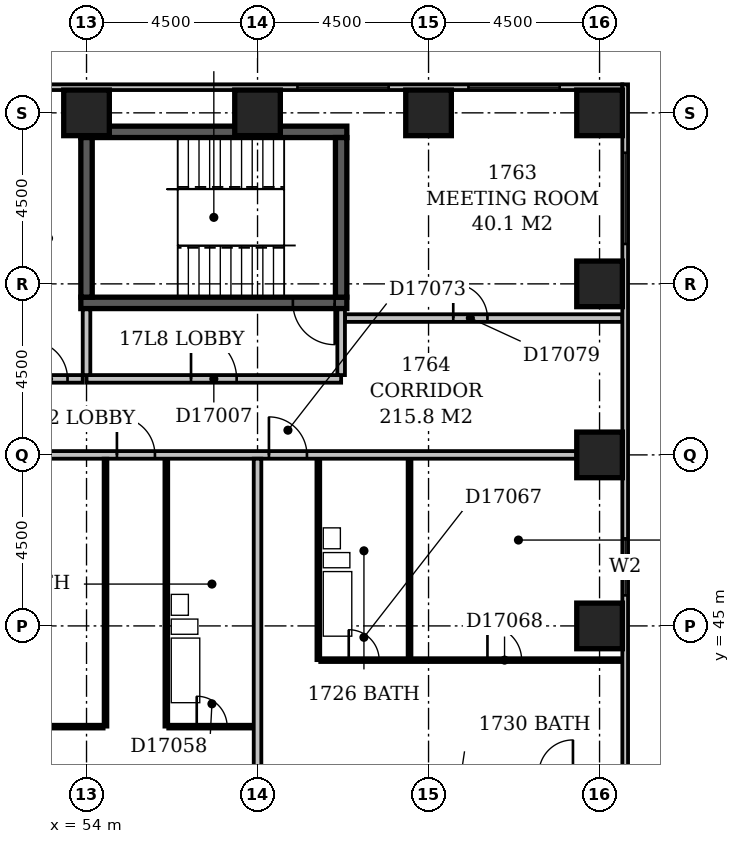
"""IFC4 building model, lengths in metres.
Left out: names, types, materials, properties, quantities, classifications, styles, units other than length and angle.
Written with IfcOpenShell. Run it as: python <this file> out.ifc"""

import sys

from ifc_helpers import new_model, si_unit, direction, frame, frame_2d, origin, origin_2d, place, context, subcontext, project, spatial, rectangle, extrude, element, fill, save


model = new_model("IFC4")
c1 = context("Model", 3, precision=1e-05, world=origin(), true_north=direction((0.0, 1.0)))
c2 = subcontext(c1, "Body", "Model", "MODEL_VIEW")
j1 = project(units=[si_unit("LENGTHUNIT", "METRE"), si_unit("PLANEANGLEUNIT", "RADIAN")], contexts=[c1])
p1 = place(None, origin())
s1 = spatial("IfcSite", under=j1, at=p1, CompositionType="ELEMENT")
p2 = place(p1, origin())
s2 = spatial("IfcBuilding", under=s1, at=p2, CompositionType="ELEMENT")
p3 = place(p2, frame((0.0, 0.0, 72.2)))
s3 = spatial("IfcBuildingStorey", under=s2, at=p3, CompositionType="ELEMENT", Elevation=72.2)
p4 = place(p3, frame((53.85, 53.5, -0.3), z_axis=(0.0, 0.0, 1.0), x_axis=(1.0, 0.0, 0.0)))
e1 = element("IfcWall", 1, at=p4, inside=s3, PredefinedType="SHEAR", context=c2, shape_type="SweptSolid", body=[
    extrude(rectangle(XDim=7.0, YDim=0.3, at=frame_2d((3.5, 0.0))), origin(), (0.0, 0.0, 1.0), 3.6),
])
p5 = place(p4, frame((5.58, 0.0, 0.3)))
e2 = element("IfcOpeningElement", 2, at=p5, cuts=e1, PredefinedType="OPENING", context=c2, shape_type="SweptSolid", body=[
    extrude(rectangle(XDim=1.1, YDim=2.1, at=frame_2d((0.55, 1.05))), frame((0.0, 0.162, 0.0), z_axis=(0.0, -1.0, 0.0), x_axis=(1.0, 0.0, 0.0)), (0.0, 0.0, 1.0), 0.324),
])
p6 = place(p3, frame((53.85, 58.0, -0.3), z_axis=(0.0, 0.0, 1.0), x_axis=(1.0, 0.0, 0.0)))
e3 = element("IfcWall", 3, at=p6, inside=s3, PredefinedType="SHEAR", context=c2, shape_type="SweptSolid", body=[
    extrude(rectangle(XDim=7.0, YDim=0.3, at=frame_2d((3.5, 0.0))), origin(), (0.0, 0.0, 1.0), 3.6),
])
for number, where, z_axis, x_axis in (
    (4, (54.0, 53.65, -0.3), (0.0, 0.0, 1.0), (0.0, 1.0, 0.0)),
    (5, (60.7, 53.65, -0.3), (0.0, 0.0, 1.0), (0.0, 1.0, 0.0)),
):
    element("IfcWall", number, at=place(p3, frame(where, z_axis=z_axis, x_axis=x_axis)), inside=s3, PredefinedType="SHEAR", context=c2, shape_type="SweptSolid", body=[
        extrude(rectangle(XDim=4.2, YDim=0.3, at=frame_2d((2.1, 0.0))), origin(), (0.0, 0.0, 1.0), 3.6),
    ])
for number, where, z_axis, x_axis in (
    (6, (67.5, 45.0, -0.3), (0.0, 0.0, 1.0), (1.0, 0.0, 0.0)),
    (7, (67.5, 49.5, -0.3), (0.0, 0.0, 1.0), (1.0, 0.0, 0.0)),
    (8, (67.5, 54.0, -0.3), (0.0, 0.0, 1.0), (1.0, 0.0, 0.0)),
    (9, (54.0, 58.5, -0.3), (0.0, 0.0, 1.0), (1.0, 0.0, 0.0)),
    (10, (58.5, 58.5, -0.3), (0.0, 0.0, 1.0), (1.0, 0.0, 0.0)),
    (11, (63.0, 58.5, -0.3), (0.0, 0.0, 1.0), (1.0, 0.0, 0.0)),
    (12, (67.5, 58.5, -0.3), (0.0, 0.0, 1.0), (1.0, 0.0, 0.0)),
):
    element("IfcColumn", number, at=place(p3, frame(where, z_axis=z_axis, x_axis=x_axis)), inside=s3, PredefinedType="COLUMN", context=c2, shape_type="SweptSolid", body=[
        extrude(rectangle(XDim=1.2, YDim=1.2, at=origin_2d()), origin(), (0.0, 0.0, 1.0), 3.6),
    ])
p7 = place(p3, frame((68.175, 35.4, 0.0), z_axis=(0.0, 0.0, 1.0), x_axis=(0.0, 1.0, 0.0)))
e13 = element("IfcWall", 13, at=p7, inside=s3, PredefinedType="STANDARD", context=c2, shape_type="SweptSolid", body=[
    extrude(rectangle(XDim=23.85, YDim=0.15, at=frame_2d((11.925, 0.0))), origin(), (0.0, 0.0, 1.0), 2.7),
])
p8 = place(p7, frame((1.65, 0.0, 0.6)))
e14 = element("IfcOpeningElement", 14, at=p8, cuts=e13, PredefinedType="OPENING", context=c2, shape_type="SweptSolid", body=[
    extrude(rectangle(XDim=2.4, YDim=1.8, at=frame_2d((1.2, 0.9))), frame((0.0, 0.087, 0.0), z_axis=(0.0, -1.0, 0.0), x_axis=(1.0, 0.0, 0.0)), (0.0, 0.0, 1.0), 0.174),
])
p9 = place(p7, frame((10.403, 0.0, 0.6)))
e15 = element("IfcOpeningElement", 15, at=p9, cuts=e13, PredefinedType="OPENING", context=c2, shape_type="SweptSolid", body=[
    extrude(rectangle(XDim=1.5, YDim=1.8, at=frame_2d((0.75, 0.9))), frame((0.0, 0.087, 0.0), z_axis=(0.0, -1.0, 0.0), x_axis=(1.0, 0.0, 0.0)), (0.0, 0.0, 1.0), 0.174),
])
p10 = place(p7, frame((19.65, 0.0, 0.6)))
e16 = element("IfcOpeningElement", 16, at=p10, cuts=e13, PredefinedType="OPENING", context=c2, shape_type="SweptSolid", body=[
    extrude(rectangle(XDim=2.4, YDim=1.8, at=frame_2d((1.2, 0.9))), frame((0.0, 0.087, 0.0), z_axis=(0.0, -1.0, 0.0), x_axis=(1.0, 0.0, 0.0)), (0.0, 0.0, 1.0), 0.174),
])
p11 = place(p3, frame((68.1, 59.175, 0.0), z_axis=(0.0, 0.0, 1.0), x_axis=(-1.0, 0.0, 0.0)))
e17 = element("IfcWall", 17, at=p11, inside=s3, PredefinedType="STANDARD", context=c2, shape_type="SweptSolid", body=[
    extrude(rectangle(XDim=68.85, YDim=0.15, at=frame_2d((34.425, 0.0))), origin(), (0.0, 0.0, 1.0), 2.7),
])
p12 = place(p11, frame((1.65, 0.0, 0.6)))
e18 = element("IfcOpeningElement", 18, at=p12, cuts=e17, PredefinedType="OPENING", context=c2, shape_type="SweptSolid", body=[
    extrude(rectangle(XDim=2.4, YDim=1.8, at=frame_2d((1.2, 0.9))), frame((0.0, 0.087, 0.0), z_axis=(0.0, -1.0, 0.0), x_axis=(1.0, 0.0, 0.0)), (0.0, 0.0, 1.0), 0.174),
])
p13 = place(p11, frame((6.15, 0.0, 0.6)))
e19 = element("IfcOpeningElement", 19, at=p13, cuts=e17, PredefinedType="OPENING", context=c2, shape_type="SweptSolid", body=[
    extrude(rectangle(XDim=2.4, YDim=1.8, at=frame_2d((1.2, 0.9))), frame((0.0, 0.087, 0.0), z_axis=(0.0, -1.0, 0.0), x_axis=(1.0, 0.0, 0.0)), (0.0, 0.0, 1.0), 0.174),
])
p14 = place(p11, frame((37.403, 0.0, 0.6)))
e20 = element("IfcOpeningElement", 20, at=p14, cuts=e17, PredefinedType="OPENING", context=c2, shape_type="SweptSolid", body=[
    extrude(rectangle(XDim=1.5, YDim=1.8, at=frame_2d((0.75, 0.9))), frame((0.0, 0.087, 0.0), z_axis=(0.0, -1.0, 0.0), x_axis=(1.0, 0.0, 0.0)), (0.0, 0.0, 1.0), 0.174),
])
p15 = place(p3, frame((54.0, 51.5, 0.0), z_axis=(0.0, 0.0, 1.0), x_axis=(1.0, 0.0, 0.0)))
e21 = element("IfcWall", 21, at=p15, inside=s3, PredefinedType="PARTITIONING", context=c2, shape_type="SweptSolid", body=[
    extrude(rectangle(XDim=6.7, YDim=0.2, at=frame_2d((3.35, 0.0))), origin(), (0.0, 0.0, 1.0), 3.3),
])
p16 = place(p15, frame((2.75, 0.0, 0.0)))
e22 = element("IfcOpeningElement", 22, at=p16, cuts=e21, PredefinedType="OPENING", context=c2, shape_type="SweptSolid", body=[
    extrude(rectangle(XDim=1.2, YDim=2.1, at=frame_2d((0.6, 1.05))), frame((0.0, 0.112, 0.0), z_axis=(0.0, -1.0, 0.0), x_axis=(1.0, 0.0, 0.0)), (0.0, 0.0, 1.0), 0.224),
])
p17 = place(p3, frame((60.7, 51.6, 0.0), z_axis=(0.0, 0.0, 1.0), x_axis=(0.0, 1.0, 0.0)))
e23 = element("IfcWall", 23, at=p17, inside=s3, PredefinedType="PARTITIONING", context=c2, shape_type="SweptSolid", body=[
    extrude(rectangle(XDim=1.73, YDim=0.2, at=frame_2d((0.865, 0.0))), origin(), (0.0, 0.0, 1.0), 3.3),
])
p18 = place(p3, frame((54.0, 51.6, 0.0), z_axis=(0.0, 0.0, 1.0), x_axis=(0.0, 1.0, 0.0)))
e24 = element("IfcWall", 24, at=p18, inside=s3, PredefinedType="PARTITIONING", context=c2, shape_type="SweptSolid", body=[
    extrude(rectangle(XDim=1.73, YDim=0.2, at=frame_2d((0.865, 0.0))), origin(), (0.0, 0.0, 1.0), 2.6),
])
p19 = place(p3, frame((58.5, 36.6, 0.0), z_axis=(0.0, 0.0, 1.0), x_axis=(0.0, 1.0, 0.0)))
e25 = element("IfcWall", 25, at=p19, inside=s3, PredefinedType="PARTITIONING", context=c2, shape_type="SweptSolid", body=[
    extrude(rectangle(XDim=12.8, YDim=0.2, at=frame_2d((6.4, 0.0))), origin(), (0.0, 0.0, 1.0), 3.3),
])
p20 = place(p3, frame((49.6, 42.35, 0.0), z_axis=(0.0, 0.0, 1.0), x_axis=(1.0, 0.0, 0.0)))
e26 = element("IfcWall", 26, at=p20, inside=s3, PredefinedType="PARTITIONING", context=c2, shape_type="SweptSolid", body=[
    extrude(rectangle(XDim=4.85, YDim=0.1, at=frame_2d((2.425, 0.0))), origin(), (0.0, 0.0, 1.0), 3.3),
])
p21 = place(p20, frame((1.95, 0.0, 0.0)))
e27 = element("IfcOpeningElement", 27, at=p21, cuts=e26, PredefinedType="OPENING", context=c2, shape_type="SweptSolid", body=[
    extrude(rectangle(XDim=0.9, YDim=2.1, at=frame_2d((0.45, 1.05))), frame((0.0, 0.062, 0.0), z_axis=(0.0, -1.0, 0.0), x_axis=(1.0, 0.0, 0.0)), (0.0, 0.0, 1.0), 0.124),
])
p22 = place(p3, frame((54.5, 42.35, 0.0), z_axis=(0.0, 0.0, 1.0), x_axis=(0.0, 1.0, 0.0)))
e28 = element("IfcWall", 28, at=p22, inside=s3, PredefinedType="PARTITIONING", context=c2, shape_type="SweptSolid", body=[
    extrude(rectangle(XDim=7.05, YDim=0.1, at=frame_2d((3.525, 0.0))), origin(), (0.0, 0.0, 1.0), 2.6),
])
p23 = place(p3, frame((56.1, 42.35, 0.0), z_axis=(0.0, 0.0, 1.0), x_axis=(0.0, 1.0, 0.0)))
e29 = element("IfcWall", 29, at=p23, inside=s3, PredefinedType="PLUMBINGWALL", context=c2, shape_type="SweptSolid", body=[
    extrude(rectangle(XDim=7.05, YDim=0.1, at=frame_2d((3.525, 0.0))), origin(), (0.0, 0.0, 1.0), 3.3),
])
p24 = place(p3, frame((56.15, 42.35, 0.0), z_axis=(0.0, 0.0, 1.0), x_axis=(1.0, 0.0, 0.0)))
e30 = element("IfcWall", 30, at=p24, inside=s3, PredefinedType="PARTITIONING", context=c2, shape_type="SweptSolid", body=[
    extrude(rectangle(XDim=2.25, YDim=0.1, at=frame_2d((1.125, 0.0))), origin(), (0.0, 0.0, 1.0), 3.3),
])
p25 = place(p24, frame((0.75, 0.0, 0.0)))
e31 = element("IfcOpeningElement", 31, at=p25, cuts=e30, PredefinedType="OPENING", context=c2, shape_type="SweptSolid", body=[
    extrude(rectangle(XDim=0.8, YDim=2.1, at=frame_2d((0.4, 1.05))), frame((0.0, 0.062, 0.0), z_axis=(0.0, -1.0, 0.0), x_axis=(1.0, 0.0, 0.0)), (0.0, 0.0, 1.0), 0.124),
])
p26 = place(p3, frame((60.1, 44.1, 0.0), z_axis=(0.0, 0.0, 1.0), x_axis=(0.0, 1.0, 0.0)))
e32 = element("IfcWall", 32, at=p26, inside=s3, PredefinedType="PLUMBINGWALL", context=c2, shape_type="SweptSolid", body=[
    extrude(rectangle(XDim=5.3, YDim=0.1, at=frame_2d((2.65, 0.0))), origin(), (0.0, 0.0, 1.0), 3.3),
])
p27 = place(p3, frame((60.15, 44.1, 0.0), z_axis=(0.0, 0.0, 1.0), x_axis=(1.0, 0.0, 0.0)))
e33 = element("IfcWall", 33, at=p27, inside=s3, PredefinedType="PARTITIONING", context=c2, shape_type="SweptSolid", body=[
    extrude(rectangle(XDim=7.95, YDim=0.1, at=frame_2d((3.975, 0.0))), origin(), (0.0, 0.0, 1.0), 3.3),
])
p28 = place(p27, frame((0.75, 0.0, 0.0)))
e34 = element("IfcOpeningElement", 34, at=p28, cuts=e33, PredefinedType="OPENING", context=c2, shape_type="SweptSolid", body=[
    extrude(rectangle(XDim=0.8, YDim=2.1, at=frame_2d((0.4, 1.05))), frame((0.0, 0.062, 0.0), z_axis=(0.0, -1.0, 0.0), x_axis=(1.0, 0.0, 0.0)), (0.0, 0.0, 1.0), 0.124),
])
p29 = place(p27, frame((4.4, 0.0, 0.0)))
e35 = element("IfcOpeningElement", 35, at=p29, cuts=e33, PredefinedType="OPENING", context=c2, shape_type="SweptSolid", body=[
    extrude(rectangle(XDim=0.9, YDim=2.1, at=frame_2d((0.45, 1.05))), frame((0.0, 0.062, 0.0), z_axis=(0.0, -1.0, 0.0), x_axis=(1.0, 0.0, 0.0)), (0.0, 0.0, 1.0), 0.124),
])
p30 = place(p3, frame((62.5, 44.15, 0.0), z_axis=(0.0, 0.0, 1.0), x_axis=(0.0, 1.0, 0.0)))
e36 = element("IfcWall", 36, at=p30, inside=s3, PredefinedType="PLUMBINGWALL", context=c2, shape_type="SweptSolid", body=[
    extrude(rectangle(XDim=5.25, YDim=0.1, at=frame_2d((2.625, 0.0))), origin(), (0.0, 0.0, 1.0), 2.4),
])
p31 = place(p3, frame((9.1, 49.5, 0.0), z_axis=(0.0, 0.0, 1.0), x_axis=(1.0, 0.0, 0.0)))
e37 = element("IfcWall", 37, at=p31, inside=s3, PredefinedType="PARTITIONING", context=c2, shape_type="SweptSolid", body=[
    extrude(rectangle(XDim=57.8, YDim=0.2, at=frame_2d((28.9, 0.0))), origin(), (0.0, 0.0, 1.0), 3.3),
])
p32 = place(p31, frame((13.7, 0.0, 0.0)))
e38 = element("IfcOpeningElement", 38, at=p32, cuts=e37, PredefinedType="OPENING", context=c2, shape_type="SweptSolid", body=[
    extrude(rectangle(XDim=1.0, YDim=2.1, at=frame_2d((0.5, 1.05))), frame((0.0, 0.112, 0.0), z_axis=(0.0, -1.0, 0.0), x_axis=(1.0, 0.0, 0.0)), (0.0, 0.0, 1.0), 0.224),
])
p33 = place(p31, frame((32.2, 0.0, 0.0)))
e39 = element("IfcOpeningElement", 39, at=p33, cuts=e37, PredefinedType="OPENING", context=c2, shape_type="SweptSolid", body=[
    extrude(rectangle(XDim=1.0, YDim=2.1, at=frame_2d((0.5, 1.05))), frame((0.0, 0.112, 0.0), z_axis=(0.0, -1.0, 0.0), x_axis=(1.0, 0.0, 0.0)), (0.0, 0.0, 1.0), 0.224),
])
p34 = place(p31, frame((37.85, 0.0, 0.0)))
e40 = element("IfcOpeningElement", 40, at=p34, cuts=e37, PredefinedType="OPENING", context=c2, shape_type="SweptSolid", body=[
    extrude(rectangle(XDim=1.0, YDim=2.1, at=frame_2d((0.5, 1.05))), frame((0.0, 0.112, 0.0), z_axis=(0.0, -1.0, 0.0), x_axis=(1.0, 0.0, 0.0)), (0.0, 0.0, 1.0), 0.224),
])
p35 = place(p31, frame((45.7, 0.0, 0.0)))
e41 = element("IfcOpeningElement", 41, at=p35, cuts=e37, PredefinedType="OPENING", context=c2, shape_type="SweptSolid", body=[
    extrude(rectangle(XDim=1.0, YDim=2.1, at=frame_2d((0.5, 1.05))), frame((0.0, 0.112, 0.0), z_axis=(0.0, -1.0, 0.0), x_axis=(1.0, 0.0, 0.0)), (0.0, 0.0, 1.0), 0.224),
])
p36 = place(p31, frame((49.7, 0.0, 0.0)))
e42 = element("IfcOpeningElement", 42, at=p36, cuts=e37, PredefinedType="OPENING", context=c2, shape_type="SweptSolid", body=[
    extrude(rectangle(XDim=1.0, YDim=2.1, at=frame_2d((0.5, 1.05))), frame((0.0, 0.112, 0.0), z_axis=(0.0, -1.0, 0.0), x_axis=(1.0, 0.0, 0.0)), (0.0, 0.0, 1.0), 0.224),
])
p37 = place(p31, frame((8.4, 0.0, 0.0)))
e43 = element("IfcOpeningElement", 43, at=p37, cuts=e37, PredefinedType="OPENING", context=c2, shape_type="SweptSolid", body=[
    extrude(rectangle(XDim=0.9, YDim=2.1, at=frame_2d((0.45, 1.05))), frame((0.0, 0.112, 0.0), z_axis=(0.0, -1.0, 0.0), x_axis=(1.0, 0.0, 0.0)), (0.0, 0.0, 1.0), 0.224),
])
p38 = place(p3, frame((52.1, 51.5, 0.0), z_axis=(0.0, 0.0, 1.0), x_axis=(1.0, 0.0, 0.0)))
e44 = element("IfcWall", 44, at=p38, inside=s3, PredefinedType="PARTITIONING", context=c2, shape_type="SweptSolid", body=[
    extrude(rectangle(XDim=1.8, YDim=0.2, at=frame_2d((0.9, 0.0))), origin(), (0.0, 0.0, 1.0), 3.3),
])
p39 = place(p38, frame((0.4, 0.0, 0.0)))
e45 = element("IfcOpeningElement", 45, at=p39, cuts=e44, PredefinedType="OPENING", context=c2, shape_type="SweptSolid", body=[
    extrude(rectangle(XDim=1.0, YDim=2.1, at=frame_2d((0.5, 1.05))), frame((0.0, 0.112, 0.0), z_axis=(0.0, -1.0, 0.0), x_axis=(1.0, 0.0, 0.0)), (0.0, 0.0, 1.0), 0.224),
])
p40 = place(p3, frame((60.8, 53.1, 0.0), z_axis=(0.0, 0.0, 1.0), x_axis=(1.0, 0.0, 0.0)))
e46 = element("IfcWall", 46, at=p40, inside=s3, PredefinedType="PARTITIONING", context=c2, shape_type="SweptSolid", body=[
    extrude(rectangle(XDim=7.3, YDim=0.2, at=frame_2d((3.65, 0.0))), origin(), (0.0, 0.0, 1.0), 3.3),
])
p41 = place(p40, frame((2.85, 0.0, 0.0)))
e47 = element("IfcOpeningElement", 47, at=p41, cuts=e46, PredefinedType="OPENING", context=c2, shape_type="SweptSolid", body=[
    extrude(rectangle(XDim=0.9, YDim=2.1, at=frame_2d((0.45, 1.05))), frame((0.0, 0.112, 0.0), z_axis=(0.0, -1.0, 0.0), x_axis=(1.0, 0.0, 0.0)), (0.0, 0.0, 1.0), 0.224),
])
p42 = place(p9, origin())
e48 = element("IfcWindow", 48, at=p42, inside=s3, PartitioningType="SINGLE_PANEL", PredefinedType="WINDOW", context=c2, shape_type="SweptSolid", body=[
    extrude(rectangle(XDim=1.5, YDim=1.8, at=frame_2d((0.75, 0.9))), frame((0.0, 0.03, 0.0), z_axis=(0.0, -1.0, 0.0), x_axis=(1.0, 0.0, 0.0)), (0.0, 0.0, 1.0), 0.06),
])
fill(e15, e48)
p43 = place(p10, origin())
e49 = element("IfcWindow", 49, at=p43, inside=s3, PartitioningType="SINGLE_PANEL", PredefinedType="WINDOW", context=c2, shape_type="SweptSolid", body=[
    extrude(rectangle(XDim=2.4, YDim=1.8, at=frame_2d((1.2, 0.9))), frame((0.0, 0.03, 0.0), z_axis=(0.0, -1.0, 0.0), x_axis=(1.0, 0.0, 0.0)), (0.0, 0.0, 1.0), 0.06),
])
fill(e16, e49)
p44 = place(p12, origin())
e50 = element("IfcWindow", 50, at=p44, inside=s3, PartitioningType="SINGLE_PANEL", PredefinedType="WINDOW", context=c2, shape_type="SweptSolid", body=[
    extrude(rectangle(XDim=2.4, YDim=1.8, at=frame_2d((1.2, 0.9))), frame((0.0, 0.03, 0.0), z_axis=(0.0, -1.0, 0.0), x_axis=(1.0, 0.0, 0.0)), (0.0, 0.0, 1.0), 0.06),
])
fill(e18, e50)
p45 = place(p13, origin())
e51 = element("IfcWindow", 51, at=p45, inside=s3, PartitioningType="SINGLE_PANEL", PredefinedType="WINDOW", context=c2, shape_type="SweptSolid", body=[
    extrude(rectangle(XDim=2.4, YDim=1.8, at=frame_2d((1.2, 0.9))), frame((0.0, 0.03, 0.0), z_axis=(0.0, -1.0, 0.0), x_axis=(1.0, 0.0, 0.0)), (0.0, 0.0, 1.0), 0.06),
])
fill(e19, e51)
p46 = place(p16, origin())
e52 = element("IfcDoor", 52, at=p46, inside=s3, OperationType="SINGLE_SWING_LEFT", PredefinedType="DOOR", context=c2, shape_type="SweptSolid", body=[
    extrude(rectangle(XDim=1.2, YDim=2.1, at=frame_2d((0.6, 1.05))), frame((0.0, 0.025, 0.0), z_axis=(0.0, -1.0, 0.0), x_axis=(1.0, 0.0, 0.0)), (0.0, 0.0, 1.0), 0.05),
])
fill(e22, e52)
p47 = place(p5, origin())
e53 = element("IfcDoor", 53, at=p47, inside=s3, OperationType="SINGLE_SWING_RIGHT", PredefinedType="DOOR", context=c2, shape_type="SweptSolid", body=[
    extrude(rectangle(XDim=1.1, YDim=2.1, at=frame_2d((0.55, 1.05))), frame((0.0, 0.025, 0.0), z_axis=(0.0, -1.0, 0.0), x_axis=(1.0, 0.0, 0.0)), (0.0, 0.0, 1.0), 0.05),
])
fill(e2, e53)
p48 = place(p25, origin())
e54 = element("IfcDoor", 54, at=p48, inside=s3, OperationType="SINGLE_SWING_LEFT", PredefinedType="DOOR", context=c2, shape_type="SweptSolid", body=[
    extrude(rectangle(XDim=0.8, YDim=2.1, at=frame_2d((0.4, 1.05))), frame((0.0, 0.025, 0.0), z_axis=(0.0, -1.0, 0.0), x_axis=(1.0, 0.0, 0.0)), (0.0, 0.0, 1.0), 0.05),
])
fill(e31, e54)
p49 = place(p28, origin())
e55 = element("IfcDoor", 55, at=p49, inside=s3, OperationType="SINGLE_SWING_LEFT", PredefinedType="DOOR", context=c2, shape_type="SweptSolid", body=[
    extrude(rectangle(XDim=0.8, YDim=2.1, at=frame_2d((0.4, 1.05))), frame((0.0, 0.025, 0.0), z_axis=(0.0, -1.0, 0.0), x_axis=(1.0, 0.0, 0.0)), (0.0, 0.0, 1.0), 0.05),
])
fill(e34, e55)
p50 = place(p29, origin())
e56 = element("IfcDoor", 56, at=p50, inside=s3, OperationType="SINGLE_SWING_LEFT", PredefinedType="DOOR", context=c2, shape_type="SweptSolid", body=[
    extrude(rectangle(XDim=0.9, YDim=2.1, at=frame_2d((0.45, 1.05))), frame((0.0, 0.025, 0.0), z_axis=(0.0, -1.0, 0.0), x_axis=(1.0, 0.0, 0.0)), (0.0, 0.0, 1.0), 0.05),
])
fill(e35, e56)
p51 = place(p35, origin())
e57 = element("IfcDoor", 57, at=p51, inside=s3, OperationType="SINGLE_SWING_LEFT", PredefinedType="DOOR", context=c2, shape_type="SweptSolid", body=[
    extrude(rectangle(XDim=1.0, YDim=2.1, at=frame_2d((0.5, 1.05))), frame((0.0, 0.025, 0.0), z_axis=(0.0, -1.0, 0.0), x_axis=(1.0, 0.0, 0.0)), (0.0, 0.0, 1.0), 0.05),
])
fill(e41, e57)
p52 = place(p36, origin())
e58 = element("IfcDoor", 58, at=p52, inside=s3, OperationType="SINGLE_SWING_LEFT", PredefinedType="DOOR", context=c2, shape_type="SweptSolid", body=[
    extrude(rectangle(XDim=1.0, YDim=2.1, at=frame_2d((0.5, 1.05))), frame((0.0, 0.025, 0.0), z_axis=(0.0, -1.0, 0.0), x_axis=(1.0, 0.0, 0.0)), (0.0, 0.0, 1.0), 0.05),
])
fill(e42, e58)
p53 = place(p39, origin())
e59 = element("IfcDoor", 59, at=p53, inside=s3, OperationType="SINGLE_SWING_LEFT", PredefinedType="DOOR", context=c2, shape_type="SweptSolid", body=[
    extrude(rectangle(XDim=1.0, YDim=2.1, at=frame_2d((0.5, 1.05))), frame((0.0, 0.025, 0.0), z_axis=(0.0, -1.0, 0.0), x_axis=(1.0, 0.0, 0.0)), (0.0, 0.0, 1.0), 0.05),
])
fill(e45, e59)
p54 = place(p41, origin())
e60 = element("IfcDoor", 60, at=p54, inside=s3, OperationType="SINGLE_SWING_LEFT", PredefinedType="DOOR", context=c2, shape_type="SweptSolid", body=[
    extrude(rectangle(XDim=0.9, YDim=2.1, at=frame_2d((0.45, 1.05))), frame((0.0, 0.025, 0.0), z_axis=(0.0, -1.0, 0.0), x_axis=(1.0, 0.0, 0.0)), (0.0, 0.0, 1.0), 0.05),
])
fill(e47, e60)
save(model, sys.argv[1])
